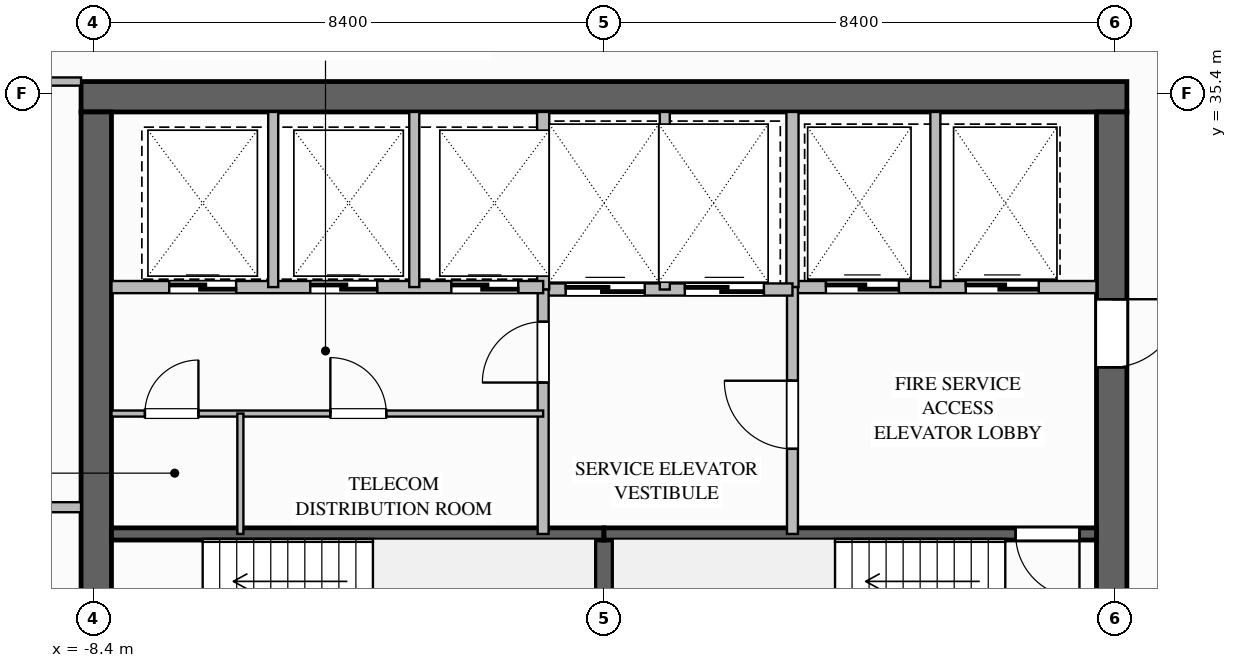
"""IFC4 building model, lengths in metres.
Left out: names, types, materials, properties, quantities, classifications, styles, units other than length and angle.
Written with IfcOpenShell. Run it as: python <this file> out.ifc"""

import sys

from ifc_helpers import new_model, si_unit, direction, frame, frame_2d, origin, place, context, subcontext, project, spatial, rectangle, extrude, element, fill, save


model = new_model("IFC4")
c1 = context("Model", 3, precision=1e-05, world=origin(), true_north=direction((0.0, 1.0)))
c2 = subcontext(c1, "Body", "Model", "MODEL_VIEW")
j1 = project(units=[si_unit("LENGTHUNIT", "METRE"), si_unit("PLANEANGLEUNIT", "RADIAN")], contexts=[c1])
p1 = place(None, origin())
s1 = spatial("IfcSite", under=j1, at=p1, CompositionType="ELEMENT")
p2 = place(p1, origin())
s2 = spatial("IfcBuilding", under=s1, at=p2, CompositionType="ELEMENT")
p3 = place(p2, frame((0.0, 0.0, 248.3)))
s3 = spatial("IfcBuildingStorey", under=s2, at=p3, CompositionType="ELEMENT", Elevation=248.3)
p4 = place(p3, frame((-8.6, 35.35, 0.0), z_axis=(0.0, 0.0, 1.0), x_axis=(1.0, 0.0, 0.0)))
e1 = element("IfcWall", 1, at=p4, inside=s3, PredefinedType="SHEAR", context=c2, shape_type="SweptSolid", body=[
    extrude(rectangle(XDim=17.2, YDim=0.5, at=frame_2d((8.6, 0.0))), origin(), (0.0, 0.0, 1.0), 3.6),
])
p5 = place(p3, frame((8.35, 35.1, 0.0), z_axis=(0.0, 0.0, 1.0), x_axis=(0.0, -1.0, 0.0)))
e2 = element("IfcWall", 2, at=p5, inside=s3, PredefinedType="SHEAR", context=c2, shape_type="SweptSolid", body=[
    extrude(rectangle(XDim=16.2, YDim=0.5, at=frame_2d((8.1, 0.0))), origin(), (0.0, 0.0, 1.0), 3.6),
])
p6 = place(p5, frame((3.08, 0.0, 0.0)))
e3 = element("IfcOpeningElement", 3, at=p6, cuts=e2, PredefinedType="OPENING", context=c2, shape_type="SweptSolid", body=[
    extrude(rectangle(XDim=1.12, YDim=2.1, at=frame_2d((0.56, 1.05))), frame((0.0, 0.26, 0.0), z_axis=(0.0, -1.0, 0.0), x_axis=(1.0, 0.0, 0.0)), (0.0, 0.0, 1.0), 0.52),
])
p7 = place(p5, frame((10.62, 0.0, 0.0)))
e4 = element("IfcOpeningElement", 4, at=p7, cuts=e2, PredefinedType="OPENING", context=c2, shape_type="SweptSolid", body=[
    extrude(rectangle(XDim=1.08, YDim=2.04, at=frame_2d((0.54, 1.02))), frame((0.0, 0.26, 0.0), z_axis=(0.0, -1.0, 0.0), x_axis=(1.0, 0.0, 0.0)), (0.0, 0.0, 1.0), 0.52),
])
p8 = place(p3, frame((-8.35, 18.9, 0.0), z_axis=(0.0, 0.0, 1.0), x_axis=(0.0, 1.0, 0.0)))
e5 = element("IfcWall", 5, at=p8, inside=s3, PredefinedType="SHEAR", context=c2, shape_type="SweptSolid", body=[
    extrude(rectangle(XDim=16.2, YDim=0.5, at=frame_2d((8.1, 0.0))), origin(), (0.0, 0.0, 1.0), 3.6),
])
p9 = place(p3, frame((0.0, 25.04, 0.0), z_axis=(0.0, 0.0, 1.0), x_axis=(0.0, 1.0, 0.0)))
e6 = element("IfcWall", 6, at=p9, inside=s3, PredefinedType="SOLIDWALL", context=c2, shape_type="SweptSolid", body=[
    extrude(rectangle(XDim=3.12, YDim=0.3, at=frame_2d((1.56, 0.0))), origin(), (0.0, 0.0, 1.0), 3.34),
])
p10 = place(p3, frame((-8.1, 28.16, 0.0), z_axis=(0.0, 0.0, 1.0), x_axis=(1.0, 0.0, 0.0)))
e7 = element("IfcWall", 7, at=p10, inside=s3, PredefinedType="SOLIDWALL", context=c2, shape_type="SweptSolid", body=[
    extrude(rectangle(XDim=8.1, YDim=0.2, at=frame_2d((4.05, 0.0))), origin(), (0.0, 0.0, 1.0), 3.34),
])
p11 = place(p3, frame((8.1, 28.16, 0.0), z_axis=(0.0, 0.0, 1.0), x_axis=(-1.0, 0.0, 0.0)))
e8 = element("IfcWall", 8, at=p11, inside=s3, PredefinedType="SOLIDWALL", context=c2, shape_type="SweptSolid", body=[
    extrude(rectangle(XDim=8.1, YDim=0.2, at=frame_2d((4.05, 0.0))), origin(), (0.0, 0.0, 1.0), 3.34),
])
p12 = place(p11, frame((0.28, 0.0, 0.0)))
e9 = element("IfcOpeningElement", 9, at=p12, cuts=e8, PredefinedType="OPENING", context=c2, shape_type="SweptSolid", body=[
    extrude(rectangle(XDim=1.05, YDim=2.1, at=frame_2d((0.525, 1.05))), frame((0.0, 0.11, 0.0), z_axis=(0.0, -1.0, 0.0), x_axis=(1.0, 0.0, 0.0)), (0.0, 0.0, 1.0), 0.22),
])
p13 = place(p3, frame((3.1, 32.22, 0.0), z_axis=(0.0, 0.0, 1.0), x_axis=(1.0, 0.0, 0.0)))
e10 = element("IfcWall", 10, at=p13, inside=s3, PredefinedType="SOLIDWALL", context=c2, shape_type="SweptSolid", body=[
    extrude(rectangle(XDim=5.0, YDim=0.2, at=frame_2d((2.5, 0.0))), origin(), (0.0, 0.0, 1.0), 3.34),
])
p14 = place(p13, frame((0.55, 0.0, 0.0)))
e11 = element("IfcOpeningElement", 11, at=p14, cuts=e10, PredefinedType="OPENING", context=c2, shape_type="SweptSolid", body=[
    extrude(rectangle(XDim=1.2, YDim=2.2, at=frame_2d((0.6, 1.1))), frame((0.0, 0.11, 0.0), z_axis=(0.0, -1.0, 0.0), x_axis=(1.0, 0.0, 0.0)), (0.0, 0.0, 1.0), 0.22),
])
p15 = place(p13, frame((2.85, 0.0, 0.0)))
e12 = element("IfcOpeningElement", 12, at=p15, cuts=e10, PredefinedType="OPENING", context=c2, shape_type="SweptSolid", body=[
    extrude(rectangle(XDim=1.2, YDim=2.2, at=frame_2d((0.6, 1.1))), frame((0.0, 0.11, 0.0), z_axis=(0.0, -1.0, 0.0), x_axis=(1.0, 0.0, 0.0)), (0.0, 0.0, 1.0), 0.22),
])
p16 = place(p3, frame((3.1, 32.22, 0.0), z_axis=(0.0, 0.0, 1.0), x_axis=(0.0, 1.0, 0.0)))
e13 = element("IfcWall", 13, at=p16, inside=s3, PredefinedType="SOLIDWALL", context=c2, shape_type="SweptSolid", body=[
    extrude(rectangle(XDim=2.88, YDim=0.2, at=frame_2d((1.44, 0.0))), origin(), (0.0, 0.0, 1.0), 3.34),
])
p17 = place(p3, frame((5.45, 32.22, 0.0), z_axis=(0.0, 0.0, 1.0), x_axis=(0.0, 1.0, 0.0)))
e14 = element("IfcWall", 14, at=p17, inside=s3, PredefinedType="PARTITIONING", context=c2, shape_type="SweptSolid", body=[
    extrude(rectangle(XDim=2.88, YDim=0.165, at=frame_2d((1.44, 0.0))), origin(), (0.0, 0.0, 1.0), 3.34),
])
p18 = place(p3, frame((3.1, 28.16, 0.0), z_axis=(0.0, 0.0, 1.0), x_axis=(0.0, 1.0, 0.0)))
e15 = element("IfcWall", 15, at=p18, inside=s3, PredefinedType="SOLIDWALL", context=c2, shape_type="SweptSolid", body=[
    extrude(rectangle(XDim=4.06, YDim=0.18, at=frame_2d((2.03, 0.0))), origin(), (0.0, 0.0, 1.0), 3.34),
])
p19 = place(p18, frame((1.4, 0.0, 0.0)))
e16 = element("IfcOpeningElement", 16, at=p19, cuts=e15, PredefinedType="OPENING", context=c2, shape_type="SweptSolid", body=[
    extrude(rectangle(XDim=1.12, YDim=2.1, at=frame_2d((0.56, 1.05))), frame((0.0, 0.1, 0.0), z_axis=(0.0, -1.0, 0.0), x_axis=(1.0, 0.0, 0.0)), (0.0, 0.0, 1.0), 0.2),
])
p20 = place(p3, frame((-1.0, 32.18, 0.0), z_axis=(0.0, 0.0, 1.0), x_axis=(1.0, 0.0, 0.0)))
e17 = element("IfcWall", 17, at=p20, inside=s3, PredefinedType="SOLIDWALL", context=c2, shape_type="SweptSolid", body=[
    extrude(rectangle(XDim=4.1, YDim=0.2, at=frame_2d((2.05, 0.0))), origin(), (0.0, 0.0, 1.0), 3.34),
])
p21 = place(p20, frame((0.37, 0.0, 0.0)))
e18 = element("IfcOpeningElement", 18, at=p21, cuts=e17, PredefinedType="OPENING", context=c2, shape_type="SweptSolid", body=[
    extrude(rectangle(XDim=1.3, YDim=2.2, at=frame_2d((0.65, 1.1))), frame((0.0, 0.11, 0.0), z_axis=(0.0, -1.0, 0.0), x_axis=(1.0, 0.0, 0.0)), (0.0, 0.0, 1.0), 0.22),
])
p22 = place(p20, frame((2.33, 0.0, 0.0)))
e19 = element("IfcOpeningElement", 19, at=p22, cuts=e17, PredefinedType="OPENING", context=c2, shape_type="SweptSolid", body=[
    extrude(rectangle(XDim=1.3, YDim=2.2, at=frame_2d((0.65, 1.1))), frame((0.0, 0.11, 0.0), z_axis=(0.0, -1.0, 0.0), x_axis=(1.0, 0.0, 0.0)), (0.0, 0.0, 1.0), 0.22),
])
p23 = place(p3, frame((-1.0, 32.18, 0.0), z_axis=(0.0, 0.0, 1.0), x_axis=(0.0, 1.0, 0.0)))
e20 = element("IfcWall", 20, at=p23, inside=s3, PredefinedType="SOLIDWALL", context=c2, shape_type="SweptSolid", body=[
    extrude(rectangle(XDim=2.92, YDim=0.2, at=frame_2d((1.46, 0.0))), origin(), (0.0, 0.0, 1.0), 3.34),
])
p24 = place(p3, frame((1.0, 32.18, 0.0), z_axis=(0.0, 0.0, 1.0), x_axis=(0.0, 1.0, 0.0)))
e21 = element("IfcWall", 21, at=p24, inside=s3, PredefinedType="PARTITIONING", context=c2, shape_type="SweptSolid", body=[
    extrude(rectangle(XDim=2.92, YDim=0.165, at=frame_2d((1.46, 0.0))), origin(), (0.0, 0.0, 1.0), 3.34),
])
p25 = place(p3, frame((-1.0, 28.16, 0.0), z_axis=(0.0, 0.0, 1.0), x_axis=(0.0, 1.0, 0.0)))
e22 = element("IfcWall", 22, at=p25, inside=s3, PredefinedType="SOLIDWALL", context=c2, shape_type="SweptSolid", body=[
    extrude(rectangle(XDim=4.02, YDim=0.18, at=frame_2d((2.01, 0.0))), origin(), (0.0, 0.0, 1.0), 3.34),
])
p26 = place(p25, frame((2.49, 0.0, 0.0)))
e23 = element("IfcOpeningElement", 23, at=p26, cuts=e22, PredefinedType="OPENING", context=c2, shape_type="SweptSolid", body=[
    extrude(rectangle(XDim=1.0, YDim=2.1, at=frame_2d((0.5, 1.05))), frame((0.0, 0.1, 0.0), z_axis=(0.0, -1.0, 0.0), x_axis=(1.0, 0.0, 0.0)), (0.0, 0.0, 1.0), 0.2),
])
p27 = place(p3, frame((-8.1, 32.22, 0.0), z_axis=(0.0, 0.0, 1.0), x_axis=(1.0, 0.0, 0.0)))
e24 = element("IfcWall", 24, at=p27, inside=s3, PredefinedType="SOLIDWALL", context=c2, shape_type="SweptSolid", body=[
    extrude(rectangle(XDim=7.1, YDim=0.2, at=frame_2d((3.55, 0.0))), origin(), (0.0, 0.0, 1.0), 3.34),
])
p28 = place(p27, frame((0.95, 0.0, 0.0)))
e25 = element("IfcOpeningElement", 25, at=p28, cuts=e24, PredefinedType="OPENING", context=c2, shape_type="SweptSolid", body=[
    extrude(rectangle(XDim=1.1, YDim=2.2, at=frame_2d((0.55, 1.1))), frame((0.0, 0.11, 0.0), z_axis=(0.0, -1.0, 0.0), x_axis=(1.0, 0.0, 0.0)), (0.0, 0.0, 1.0), 0.22),
])
p29 = place(p27, frame((3.27, 0.0, 0.0)))
e26 = element("IfcOpeningElement", 26, at=p29, cuts=e24, PredefinedType="OPENING", context=c2, shape_type="SweptSolid", body=[
    extrude(rectangle(XDim=1.1, YDim=2.2, at=frame_2d((0.55, 1.1))), frame((0.0, 0.11, 0.0), z_axis=(0.0, -1.0, 0.0), x_axis=(1.0, 0.0, 0.0)), (0.0, 0.0, 1.0), 0.22),
])
p30 = place(p27, frame((5.59, 0.0, 0.0)))
e27 = element("IfcOpeningElement", 27, at=p30, cuts=e24, PredefinedType="OPENING", context=c2, shape_type="SweptSolid", body=[
    extrude(rectangle(XDim=1.1, YDim=2.2, at=frame_2d((0.55, 1.1))), frame((0.0, 0.11, 0.0), z_axis=(0.0, -1.0, 0.0), x_axis=(1.0, 0.0, 0.0)), (0.0, 0.0, 1.0), 0.22),
])
for number, where, z_axis, x_axis in (
    (28, (-5.44, 32.22, 0.0), (0.0, 0.0, 1.0), (0.0, 1.0, 0.0)),
    (29, (-3.12, 32.22, 0.0), (0.0, 0.0, 1.0), (0.0, 1.0, 0.0)),
):
    element("IfcWall", number, at=place(p3, frame(where, z_axis=z_axis, x_axis=x_axis)), inside=s3, PredefinedType="PARTITIONING", context=c2, shape_type="SweptSolid", body=[
        extrude(rectangle(XDim=2.88, YDim=0.165, at=frame_2d((1.44, 0.0))), origin(), (0.0, 0.0, 1.0), 3.34),
    ])
p31 = place(p3, frame((-8.1, 30.14, 0.0), z_axis=(0.0, 0.0, 1.0), x_axis=(1.0, 0.0, 0.0)))
e30 = element("IfcWall", 30, at=p31, inside=s3, PredefinedType="PARTITIONING", context=c2, shape_type="SweptSolid", body=[
    extrude(rectangle(XDim=7.1, YDim=0.1, at=frame_2d((3.55, 0.0))), origin(), (0.0, 0.0, 1.0), 3.34),
])
p32 = place(p31, frame((0.55, 0.0, 0.0)))
e31 = element("IfcOpeningElement", 31, at=p32, cuts=e30, PredefinedType="OPENING", context=c2, shape_type="SweptSolid", body=[
    extrude(rectangle(XDim=0.88, YDim=2.1, at=frame_2d((0.44, 1.05))), frame((0.0, 0.06, 0.0), z_axis=(0.0, -1.0, 0.0), x_axis=(1.0, 0.0, 0.0)), (0.0, 0.0, 1.0), 0.12),
])
p33 = place(p31, frame((3.6, 0.0, 0.0)))
e32 = element("IfcOpeningElement", 32, at=p33, cuts=e30, PredefinedType="OPENING", context=c2, shape_type="SweptSolid", body=[
    extrude(rectangle(XDim=0.92, YDim=2.1, at=frame_2d((0.46, 1.05))), frame((0.0, 0.06, 0.0), z_axis=(0.0, -1.0, 0.0), x_axis=(1.0, 0.0, 0.0)), (0.0, 0.0, 1.0), 0.12),
])
p34 = place(p3, frame((-5.98, 28.16, 0.0), z_axis=(0.0, 0.0, 1.0), x_axis=(0.0, 1.0, 0.0)))
e33 = element("IfcWall", 33, at=p34, inside=s3, PredefinedType="PARTITIONING", context=c2, shape_type="SweptSolid", body=[
    extrude(rectangle(XDim=1.98, YDim=0.1, at=frame_2d((0.99, 0.0))), origin(), (0.0, 0.0, 1.0), 3.34),
])
p35 = place(p3, frame((-16.2, 35.6, 0.0), z_axis=(0.0, 0.0, 1.0), x_axis=(1.0, 0.0, 0.0)))
e34 = element("IfcWall", 34, at=p35, inside=s3, PredefinedType="PARTITIONING", context=c2, shape_type="SweptSolid", body=[
    extrude(rectangle(XDim=7.6, YDim=0.135, at=frame_2d((3.8, 0.0))), origin(), (0.0, 0.0, 1.0), 2.717),
])
p36 = place(p35, frame((4.585, 0.0, 0.0)))
e35 = element("IfcOpeningElement", 35, at=p36, cuts=e34, PredefinedType="OPENING", context=c2, shape_type="SweptSolid", body=[
    extrude(rectangle(XDim=1.26, YDim=2.2, at=frame_2d((0.63, 1.1))), frame((0.0, 0.077, 0.0), z_axis=(0.0, -1.0, 0.0), x_axis=(1.0, 0.0, 0.0)), (0.0, 0.0, 1.0), 0.155),
])
p37 = place(p3, frame((-21.4, 28.6, 0.0), z_axis=(0.0, 0.0, 1.0), x_axis=(1.0, 0.0, 0.0)))
e36 = element("IfcWall", 36, at=p37, inside=s3, PredefinedType="PARTITIONING", context=c2, shape_type="SweptSolid", body=[
    extrude(rectangle(XDim=12.8, YDim=0.165, at=frame_2d((6.4, 0.0))), origin(), (0.0, 0.0, 1.0), 3.34),
])
p38 = place(p12, origin())
e37 = element("IfcDoor", 37, at=p38, inside=s3, OperationType="SINGLE_SWING_LEFT", PredefinedType="DOOR", context=c2, shape_type="SweptSolid", body=[
    extrude(rectangle(XDim=1.05, YDim=2.1, at=frame_2d((0.525, 1.05))), frame((0.0, 0.025, 0.0), z_axis=(0.0, -1.0, 0.0), x_axis=(1.0, 0.0, 0.0)), (0.0, 0.0, 1.0), 0.05),
])
fill(e9, e37)
p39 = place(p14, origin())
e38 = element("IfcDoor", 38, at=p39, inside=s3, OperationType="SLIDING_TO_LEFT", PredefinedType="DOOR", context=c2, shape_type="SweptSolid", body=[
    extrude(rectangle(XDim=1.2, YDim=2.2, at=frame_2d((0.6, 1.1))), frame((0.0, 0.025, 0.0), z_axis=(0.0, -1.0, 0.0), x_axis=(1.0, 0.0, 0.0)), (0.0, 0.0, 1.0), 0.05),
])
fill(e11, e38)
p40 = place(p15, origin())
e39 = element("IfcDoor", 39, at=p40, inside=s3, OperationType="SLIDING_TO_LEFT", PredefinedType="DOOR", context=c2, shape_type="SweptSolid", body=[
    extrude(rectangle(XDim=1.2, YDim=2.2, at=frame_2d((0.6, 1.1))), frame((0.0, 0.025, 0.0), z_axis=(0.0, -1.0, 0.0), x_axis=(1.0, 0.0, 0.0)), (0.0, 0.0, 1.0), 0.05),
])
fill(e12, e39)
p41 = place(p19, origin())
e40 = element("IfcDoor", 40, at=p41, inside=s3, OperationType="SINGLE_SWING_RIGHT", PredefinedType="DOOR", context=c2, shape_type="SweptSolid", body=[
    extrude(rectangle(XDim=1.12, YDim=2.1, at=frame_2d((0.56, 1.05))), frame((0.0, 0.025, 0.0), z_axis=(0.0, -1.0, 0.0), x_axis=(1.0, 0.0, 0.0)), (0.0, 0.0, 1.0), 0.05),
])
fill(e16, e40)
p42 = place(p6, origin())
e41 = element("IfcDoor", 41, at=p42, inside=s3, OperationType="SINGLE_SWING_LEFT", PredefinedType="DOOR", context=c2, shape_type="SweptSolid", body=[
    extrude(rectangle(XDim=1.12, YDim=2.1, at=frame_2d((0.56, 1.05))), frame((0.0, 0.025, 0.0), z_axis=(0.0, -1.0, 0.0), x_axis=(1.0, 0.0, 0.0)), (0.0, 0.0, 1.0), 0.05),
])
fill(e3, e41)
p43 = place(p21, origin())
e42 = element("IfcDoor", 42, at=p43, inside=s3, OperationType="SLIDING_TO_LEFT", PredefinedType="DOOR", context=c2, shape_type="SweptSolid", body=[
    extrude(rectangle(XDim=1.3, YDim=2.2, at=frame_2d((0.65, 1.1))), frame((0.0, 0.025, 0.0), z_axis=(0.0, -1.0, 0.0), x_axis=(1.0, 0.0, 0.0)), (0.0, 0.0, 1.0), 0.05),
])
fill(e18, e42)
p44 = place(p22, origin())
e43 = element("IfcDoor", 43, at=p44, inside=s3, OperationType="SLIDING_TO_LEFT", PredefinedType="DOOR", context=c2, shape_type="SweptSolid", body=[
    extrude(rectangle(XDim=1.3, YDim=2.2, at=frame_2d((0.65, 1.1))), frame((0.0, 0.025, 0.0), z_axis=(0.0, -1.0, 0.0), x_axis=(1.0, 0.0, 0.0)), (0.0, 0.0, 1.0), 0.05),
])
fill(e19, e43)
p45 = place(p26, origin())
e44 = element("IfcDoor", 44, at=p45, inside=s3, OperationType="SINGLE_SWING_LEFT", PredefinedType="DOOR", context=c2, shape_type="SweptSolid", body=[
    extrude(rectangle(XDim=1.0, YDim=2.1, at=frame_2d((0.5, 1.05))), frame((0.0, 0.025, 0.0), z_axis=(0.0, -1.0, 0.0), x_axis=(1.0, 0.0, 0.0)), (0.0, 0.0, 1.0), 0.05),
])
fill(e23, e44)
p46 = place(p28, origin())
e45 = element("IfcDoor", 45, at=p46, inside=s3, OperationType="SLIDING_TO_LEFT", PredefinedType="DOOR", context=c2, shape_type="SweptSolid", body=[
    extrude(rectangle(XDim=1.1, YDim=2.2, at=frame_2d((0.55, 1.1))), frame((0.0, 0.025, 0.0), z_axis=(0.0, -1.0, 0.0), x_axis=(1.0, 0.0, 0.0)), (0.0, 0.0, 1.0), 0.05),
])
fill(e25, e45)
p47 = place(p29, origin())
e46 = element("IfcDoor", 46, at=p47, inside=s3, OperationType="SLIDING_TO_LEFT", PredefinedType="DOOR", context=c2, shape_type="SweptSolid", body=[
    extrude(rectangle(XDim=1.1, YDim=2.2, at=frame_2d((0.55, 1.1))), frame((0.0, 0.025, 0.0), z_axis=(0.0, -1.0, 0.0), x_axis=(1.0, 0.0, 0.0)), (0.0, 0.0, 1.0), 0.05),
])
fill(e26, e46)
p48 = place(p30, origin())
e47 = element("IfcDoor", 47, at=p48, inside=s3, OperationType="SLIDING_TO_LEFT", PredefinedType="DOOR", context=c2, shape_type="SweptSolid", body=[
    extrude(rectangle(XDim=1.1, YDim=2.2, at=frame_2d((0.55, 1.1))), frame((0.0, 0.025, 0.0), z_axis=(0.0, -1.0, 0.0), x_axis=(1.0, 0.0, 0.0)), (0.0, 0.0, 1.0), 0.05),
])
fill(e27, e47)
p49 = place(p32, origin())
e48 = element("IfcDoor", 48, at=p49, inside=s3, OperationType="SINGLE_SWING_RIGHT", PredefinedType="DOOR", context=c2, shape_type="SweptSolid", body=[
    extrude(rectangle(XDim=0.88, YDim=2.1, at=frame_2d((0.44, 1.05))), frame((0.0, 0.025, 0.0), z_axis=(0.0, -1.0, 0.0), x_axis=(1.0, 0.0, 0.0)), (0.0, 0.0, 1.0), 0.05),
])
fill(e31, e48)
p50 = place(p33, origin())
e49 = element("IfcDoor", 49, at=p50, inside=s3, OperationType="SINGLE_SWING_LEFT", PredefinedType="DOOR", context=c2, shape_type="SweptSolid", body=[
    extrude(rectangle(XDim=0.92, YDim=2.1, at=frame_2d((0.46, 1.05))), frame((0.0, 0.025, 0.0), z_axis=(0.0, -1.0, 0.0), x_axis=(1.0, 0.0, 0.0)), (0.0, 0.0, 1.0), 0.05),
])
fill(e32, e49)
save(model, sys.argv[1])
